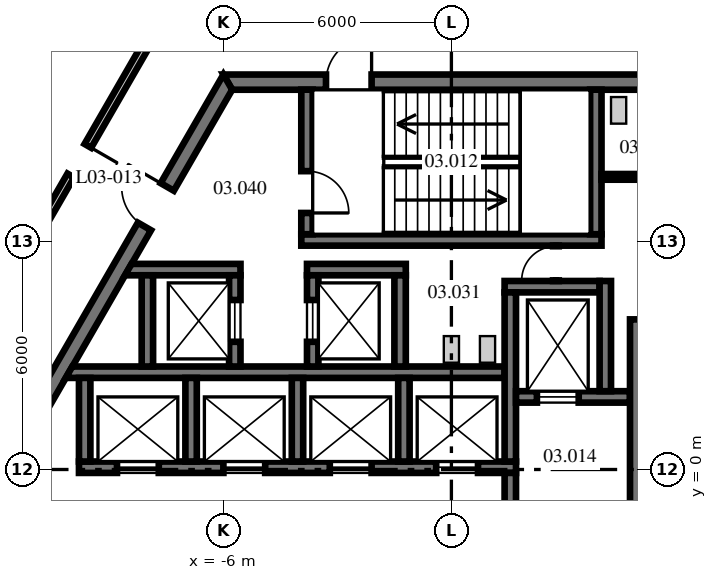
"""IFC4 building model, lengths in metres.
Left out: names, types, materials, properties, quantities, classifications, styles, units other than length and angle.
Written with IfcOpenShell. Run it as: python <this file> out.ifc"""

import sys

from ifc_helpers import new_model, si_unit, direction, frame, frame_2d, origin, place, context, subcontext, project, spatial, polyline, rectangle, outline, extrude, source, transform, mapped, element, fill, save


model = new_model("IFC4")
c1 = context("Model", 3, precision=1e-05, world=origin(), true_north=direction((0.0, 1.0)))
c2 = subcontext(c1, "Body", "Model", "MODEL_VIEW")
j1 = project(units=[si_unit("LENGTHUNIT", "METRE"), si_unit("PLANEANGLEUNIT", "RADIAN")], contexts=[c1])
p1 = place(None, origin())
s1 = spatial("IfcSite", under=j1, at=p1, CompositionType="ELEMENT")
p2 = place(p1, origin())
s2 = spatial("IfcBuilding", under=s1, at=p2, CompositionType="ELEMENT")
p3 = place(p2, frame((0.0, 0.0, 16.0)))
s3 = spatial("IfcBuildingStorey", under=s2, at=p3, CompositionType="ELEMENT", Elevation=16.0)
m1 = source(origin(), c2, "Body", "SweptSolid", [
    extrude(outline(polyline([(-0.115, -0.2), (11.885, -0.2), (11.654, 0.2), (0.115, 0.2), (-0.115, -0.2)])), origin(), (0.0, 0.0, 1.0), 4.1),
])
p4 = place(p3, frame((5.885, 10.192, 0.0), z_axis=(0.0, 0.0, 1.0), x_axis=(-1.0, 0.0, 0.0)))
e1 = element("IfcWall", 1, at=p4, inside=s3, PredefinedType="SHEAR", context=c2, shape_type="MappedRepresentation", body=[
    mapped(m1, transform((0.0, 0.0, 0.0), scale=1.0)),
])
p5 = place(p4, frame((7.985, 0.0, 0.0)))
e2 = element("IfcOpeningElement", 2, at=p5, cuts=e1, PredefinedType="OPENING", context=c2, shape_type="SweptSolid", body=[
    extrude(rectangle(XDim=1.2, YDim=2.1, at=frame_2d((0.6, 1.05))), frame((0.0, 0.21, 0.0), z_axis=(0.0, -1.0, 0.0), x_axis=(1.0, 0.0, 0.0)), (0.0, 0.0, 1.0), 0.42),
])
p6 = place(p3, frame((-5.885, 10.192, 0.0), z_axis=(0.0, 0.0, 1.0), x_axis=(-0.499996592174, -0.866027371285, 0.0)))
e3 = element("IfcWall", 3, at=p6, inside=s3, PredefinedType="SHEAR", context=c2, shape_type="MappedRepresentation", body=[
    mapped(m1, transform((0.0, 0.0, 0.0), scale=1.0)),
])
p7 = place(p6, frame((3.185, 0.0, 0.0)))
e4 = element("IfcOpeningElement", 4, at=p7, cuts=e3, PredefinedType="OPENING", context=c2, shape_type="SweptSolid", body=[
    extrude(rectangle(XDim=1.2, YDim=2.1, at=frame_2d((0.6, 1.05))), frame((0.0, 0.21, 0.0), z_axis=(0.0, -1.0, 0.0), x_axis=(1.0, 0.0, 0.0)), (0.0, 0.0, 1.0), 0.42),
])
p8 = place(p3, frame((-11.769, 0.0, 0.0), z_axis=(0.0, 0.0, 1.0), x_axis=(0.499996592174, -0.866027371285, 0.0)))
e5 = element("IfcWall", 5, at=p8, inside=s3, PredefinedType="SHEAR", context=c2, shape_type="MappedRepresentation", body=[
    mapped(m1, transform((0.0, 0.0, 0.0), scale=1.0)),
])
p9 = place(p8, frame((1.405, 0.0, 0.0)))
e6 = element("IfcOpeningElement", 6, at=p9, cuts=e5, PredefinedType="OPENING", context=c2, shape_type="SweptSolid", body=[
    extrude(rectangle(XDim=1.8, YDim=2.1, at=frame_2d((0.9, 1.05))), frame((0.0, 0.21, 0.0), z_axis=(0.0, -1.0, 0.0), x_axis=(1.0, 0.0, 0.0)), (0.0, 0.0, 1.0), 0.42),
])
p10 = place(p8, frame((7.915, 0.0, 0.0)))
e7 = element("IfcOpeningElement", 7, at=p10, cuts=e5, PredefinedType="OPENING", context=c2, shape_type="SweptSolid", body=[
    extrude(rectangle(XDim=1.2, YDim=2.1, at=frame_2d((0.6, 1.05))), frame((0.0, 0.21, 0.0), z_axis=(0.0, -1.0, 0.0), x_axis=(1.0, 0.0, 0.0)), (0.0, 0.0, 1.0), 0.42),
])
m2 = source(origin(), c2, "Body", "SweptSolid", [
    extrude(rectangle(XDim=11.5, YDim=0.3, at=frame_2d((5.75, 0.0))), origin(), (0.0, 0.0, 1.0), 4.1),
])
p11 = place(p3, frame((-9.8, 0.06, 0.0), z_axis=(0.0, 0.0, 1.0), x_axis=(1.0, 0.0, 0.0)))
e8 = element("IfcWall", 8, at=p11, inside=s3, PredefinedType="SHEAR", context=c2, shape_type="MappedRepresentation", body=[
    mapped(m2, transform((0.0, 0.0, 0.0), scale=1.0)),
])
p12 = place(p11, frame((1.0, 0.0, 0.0)))
e9 = element("IfcOpeningElement", 9, at=p12, cuts=e8, PredefinedType="OPENING", context=c2, shape_type="SweptSolid", body=[
    extrude(rectangle(XDim=1.1, YDim=2.1, at=frame_2d((0.55, 1.05))), frame((0.0, 0.16, 0.0), z_axis=(0.0, -1.0, 0.0), x_axis=(1.0, 0.0, 0.0)), (0.0, 0.0, 1.0), 0.32),
])
p13 = place(p11, frame((3.8, 0.0, 0.0)))
e10 = element("IfcOpeningElement", 10, at=p13, cuts=e8, PredefinedType="OPENING", context=c2, shape_type="SweptSolid", body=[
    extrude(rectangle(XDim=1.1, YDim=2.1, at=frame_2d((0.55, 1.05))), frame((0.0, 0.16, 0.0), z_axis=(0.0, -1.0, 0.0), x_axis=(1.0, 0.0, 0.0)), (0.0, 0.0, 1.0), 0.32),
])
p14 = place(p11, frame((6.6, 0.0, 0.0)))
e11 = element("IfcOpeningElement", 11, at=p14, cuts=e8, PredefinedType="OPENING", context=c2, shape_type="SweptSolid", body=[
    extrude(rectangle(XDim=1.1, YDim=2.1, at=frame_2d((0.55, 1.05))), frame((0.0, 0.16, 0.0), z_axis=(0.0, -1.0, 0.0), x_axis=(1.0, 0.0, 0.0)), (0.0, 0.0, 1.0), 0.32),
])
p15 = place(p11, frame((9.4, 0.0, 0.0)))
e12 = element("IfcOpeningElement", 12, at=p15, cuts=e8, PredefinedType="OPENING", context=c2, shape_type="SweptSolid", body=[
    extrude(rectangle(XDim=1.1, YDim=2.1, at=frame_2d((0.55, 1.05))), frame((0.0, 0.16, 0.0), z_axis=(0.0, -1.0, 0.0), x_axis=(1.0, 0.0, 0.0)), (0.0, 0.0, 1.0), 0.32),
])
m3 = source(origin(), c2, "Body", "SweptSolid", [
    extrude(outline(polyline([(11.2, -0.15), (-0.349, -0.15), (-0.176, 0.15), (11.2, 0.15), (11.2, -0.15)])), origin(), (0.0, 0.0, 1.0), 4.1),
])
p16 = place(p3, frame((-9.8, 2.56, 0.0), z_axis=(0.0, 0.0, 1.0), x_axis=(1.0, 0.0, 0.0)))
e13 = element("IfcWall", 13, at=p16, inside=s3, PredefinedType="SHEAR", context=c2, shape_type="MappedRepresentation", body=[
    mapped(m3, transform((0.0, 0.0, 0.0), scale=1.0)),
])
m4 = source(origin(), c2, "Body", "SweptSolid", [
    extrude(rectangle(XDim=2.5, YDim=0.3, at=frame_2d((1.25, 0.0))), origin(), (0.0, 0.0, 1.0), 4.1),
])
p17 = place(p3, frame((1.4, 4.81, 0.0), z_axis=(0.0, 0.0, 1.0), x_axis=(1.0, 0.0, 0.0)))
e14 = element("IfcWall", 14, at=p17, inside=s3, PredefinedType="SHEAR", context=c2, shape_type="MappedRepresentation", body=[
    mapped(m4, transform((0.0, 0.0, 0.0), scale=1.0)),
])
m5 = source(origin(), c2, "Body", "SweptSolid", [
    extrude(rectangle(XDim=4.45, YDim=0.3, at=frame_2d((2.225, 0.0))), origin(), (0.0, 0.0, 1.0), 4.1),
])
p18 = place(p3, frame((1.55, 0.21, 0.0), z_axis=(0.0, 0.0, 1.0), x_axis=(0.0, 1.0, 0.0)))
e15 = element("IfcWall", 15, at=p18, inside=s3, PredefinedType="SHEAR", context=c2, shape_type="MappedRepresentation", body=[
    mapped(m5, transform((0.0, 0.0, 0.0), scale=1.0)),
])
m6 = source(origin(), c2, "Body", "SweptSolid", [
    extrude(rectangle(XDim=3.0, YDim=0.3, at=frame_2d((1.5, 0.0))), origin(), (0.0, 0.0, 1.0), 4.1),
])
p19 = place(p3, frame((1.7, 1.91, 0.0), z_axis=(0.0, 0.0, 1.0), x_axis=(1.0, 0.0, 0.0)))
e16 = element("IfcWall", 16, at=p19, inside=s3, PredefinedType="SHEAR", context=c2, shape_type="MappedRepresentation", body=[
    mapped(m6, transform((0.0, 0.0, 0.0), scale=1.0)),
])
p20 = place(p19, frame((0.55, 0.0, 0.0)))
e17 = element("IfcOpeningElement", 17, at=p20, cuts=e16, PredefinedType="OPENING", context=c2, shape_type="SweptSolid", body=[
    extrude(rectangle(XDim=1.1, YDim=2.1, at=frame_2d((0.55, 1.05))), frame((0.0, 0.16, 0.0), z_axis=(0.0, -1.0, 0.0), x_axis=(1.0, 0.0, 0.0)), (0.0, 0.0, 1.0), 0.32),
])
m7 = source(origin(), c2, "Body", "SweptSolid", [
    extrude(rectangle(XDim=2.9, YDim=0.3, at=frame_2d((1.45, 0.0))), origin(), (0.0, 0.0, 1.0), 4.1),
])
p21 = place(p3, frame((4.05, 2.06, 0.0), z_axis=(0.0, 0.0, 1.0), x_axis=(0.0, 1.0, 0.0)))
e18 = element("IfcWall", 18, at=p21, inside=s3, PredefinedType="SHEAR", context=c2, shape_type="MappedRepresentation", body=[
    mapped(m7, transform((0.0, 0.0, 0.0), scale=1.0)),
])
m8 = source(origin(), c2, "Body", "SweptSolid", [
    extrude(rectangle(XDim=2.2, YDim=0.3, at=frame_2d((1.1, 0.0))), origin(), (0.0, 0.0, 1.0), 4.1),
])
p22 = place(p3, frame((-9.65, 0.21, 0.0), z_axis=(0.0, 0.0, 1.0), x_axis=(0.0, 1.0, 0.0)))
e19 = element("IfcWall", 19, at=p22, inside=s3, PredefinedType="SHEAR", context=c2, shape_type="MappedRepresentation", body=[
    mapped(m8, transform((0.0, 0.0, 0.0), scale=1.0)),
])
p23 = place(p3, frame((1.55, -3.09, 0.0), z_axis=(0.0, 0.0, 1.0), x_axis=(0.0, 1.0, 0.0)))
e20 = element("IfcWall", 20, at=p23, inside=s3, PredefinedType="SHEAR", context=c2, shape_type="MappedRepresentation", body=[
    mapped(m6, transform((0.0, 0.0, 0.0), scale=1.0)),
])
p24 = place(p23, frame((0.9, 0.0, 0.0)))
e21 = element("IfcOpeningElement", 21, at=p24, cuts=e20, PredefinedType="OPENING", context=c2, shape_type="SweptSolid", body=[
    extrude(rectangle(XDim=1.2, YDim=2.1, at=frame_2d((0.6, 1.05))), frame((0.0, 0.16, 0.0), z_axis=(0.0, -1.0, 0.0), x_axis=(1.0, 0.0, 0.0)), (0.0, 0.0, 1.0), 0.32),
])
m9 = source(origin(), c2, "Body", "SweptSolid", [
    extrude(outline(polyline([(-0.15, -0.15), (9.99, -0.15), (9.99, 0.15), (0.15, 0.15), (-0.15, -0.15)])), origin(), (0.0, 0.0, 1.0), 4.1),
])
p25 = place(p3, frame((4.85, -6.04, 0.0), z_axis=(0.0, 0.0, 1.0), x_axis=(0.0, 1.0, 0.0)))
e22 = element("IfcWall", 22, at=p25, inside=s3, PredefinedType="SHEAR", context=c2, shape_type="MappedRepresentation", body=[
    mapped(m9, transform((0.0, 0.0, 0.0), scale=1.0)),
])
p26 = place(p25, frame((3.19, 0.0, 0.0)))
e23 = element("IfcOpeningElement", 23, at=p26, cuts=e22, PredefinedType="OPENING", context=c2, shape_type="SweptSolid", body=[
    extrude(rectangle(XDim=1.1, YDim=2.1, at=frame_2d((0.55, 1.05))), frame((0.0, 0.16, 0.0), z_axis=(0.0, -1.0, 0.0), x_axis=(1.0, 0.0, 0.0)), (0.0, 0.0, 1.0), 0.32),
])
m10 = source(origin(), c2, "Body", "SweptSolid", [
    extrude(rectangle(XDim=7.9, YDim=0.3, at=frame_2d((3.95, 0.0))), origin(), (0.0, 0.0, 1.0), 4.1),
])
p27 = place(p3, frame((-3.95, 6.04, 0.0), z_axis=(0.0, 0.0, 1.0), x_axis=(1.0, 0.0, 0.0)))
e24 = element("IfcWall", 24, at=p27, inside=s3, PredefinedType="SHEAR", context=c2, shape_type="MappedRepresentation", body=[
    mapped(m10, transform((0.0, 0.0, 0.0), scale=1.0)),
])
m11 = source(origin(), c2, "Body", "SweptSolid", [
    extrude(outline(polyline([(0.0, -0.15), (0.0, 0.15), (3.804, 0.15), (3.804, -0.15), (0.0, -0.15)])), origin(), (0.0, 0.0, 1.0), 4.1),
])
p28 = place(p3, frame((-3.8, 6.19, 0.0), z_axis=(0.0, 0.0, 1.0), x_axis=(0.0, 1.0, 0.0)))
e25 = element("IfcWall", 25, at=p28, inside=s3, PredefinedType="SHEAR", context=c2, shape_type="MappedRepresentation", body=[
    mapped(m11, transform((0.0, 0.0, 0.0), scale=1.0)),
])
p29 = place(p28, frame((0.56, 0.0, 0.0)))
e26 = element("IfcOpeningElement", 26, at=p29, cuts=e25, PredefinedType="OPENING", context=c2, shape_type="SweptSolid", body=[
    extrude(rectangle(XDim=1.1, YDim=2.1, at=frame_2d((0.55, 1.05))), frame((0.0, 0.16, 0.0), z_axis=(0.0, -1.0, 0.0), x_axis=(1.0, 0.0, 0.0)), (0.0, 0.0, 1.0), 0.32),
])
p30 = place(p3, frame((3.8, 6.19, 0.0), z_axis=(0.0, 0.0, 1.0), x_axis=(0.0, 1.0, 0.0)))
e27 = element("IfcWall", 27, at=p30, inside=s3, PredefinedType="SHEAR", context=c2, shape_type="MappedRepresentation", body=[
    mapped(m11, transform((0.0, 0.0, 0.0), scale=1.0)),
])
m12 = source(origin(), c2, "Body", "SweptSolid", [
    extrude(outline(polyline([(2.6, -0.15), (-0.44, -0.15), (-0.267, 0.15), (2.6, 0.15), (2.6, -0.15)])), origin(), (0.0, 0.0, 1.0), 4.1),
])
p31 = place(p3, frame((-8.15, 5.26, 0.0), z_axis=(0.0, 0.0, 1.0), x_axis=(1.0, 0.0, 0.0)))
e28 = element("IfcWall", 28, at=p31, inside=s3, PredefinedType="SHEAR", context=c2, shape_type="MappedRepresentation", body=[
    mapped(m12, transform((0.0, 0.0, 0.0), scale=1.0)),
])
m13 = source(origin(), c2, "Body", "SweptSolid", [
    extrude(rectangle(XDim=2.4, YDim=0.3, at=frame_2d((1.2, 0.0))), origin(), (0.0, 0.0, 1.0), 4.1),
])
p32 = place(p3, frame((-8.0, 2.71, 0.0), z_axis=(0.0, 0.0, 1.0), x_axis=(0.0, 1.0, 0.0)))
e29 = element("IfcWall", 29, at=p32, inside=s3, PredefinedType="SHEAR", context=c2, shape_type="MappedRepresentation", body=[
    mapped(m13, transform((0.0, 0.0, 0.0), scale=1.0)),
])
p33 = place(p3, frame((-5.7, 2.71, 0.0), z_axis=(0.0, 0.0, 1.0), x_axis=(0.0, 1.0, 0.0)))
e30 = element("IfcWall", 30, at=p33, inside=s3, PredefinedType="SHEAR", context=c2, shape_type="MappedRepresentation", body=[
    mapped(m13, transform((0.0, 0.0, 0.0), scale=1.0)),
])
p34 = place(p33, frame((0.65, 0.0, 0.0)))
e31 = element("IfcOpeningElement", 31, at=p34, cuts=e30, PredefinedType="OPENING", context=c2, shape_type="SweptSolid", body=[
    extrude(rectangle(XDim=1.1, YDim=2.1, at=frame_2d((0.55, 1.05))), frame((0.0, 0.16, 0.0), z_axis=(0.0, -1.0, 0.0), x_axis=(1.0, 0.0, 0.0)), (0.0, 0.0, 1.0), 0.32),
])
m14 = source(origin(), c2, "Body", "SweptSolid", [
    extrude(rectangle(XDim=2.6, YDim=0.3, at=frame_2d((1.3, 0.0))), origin(), (0.0, 0.0, 1.0), 4.1),
])
p35 = place(p3, frame((-3.8, 5.26, 0.0), z_axis=(0.0, 0.0, 1.0), x_axis=(1.0, 0.0, 0.0)))
e32 = element("IfcWall", 32, at=p35, inside=s3, PredefinedType="SHEAR", context=c2, shape_type="MappedRepresentation", body=[
    mapped(m14, transform((0.0, 0.0, 0.0), scale=1.0)),
])
p36 = place(p3, frame((-3.65, 2.71, 0.0), z_axis=(0.0, 0.0, 1.0), x_axis=(0.0, 1.0, 0.0)))
e33 = element("IfcWall", 33, at=p36, inside=s3, PredefinedType="SHEAR", context=c2, shape_type="MappedRepresentation", body=[
    mapped(m13, transform((0.0, 0.0, 0.0), scale=1.0)),
])
p37 = place(p36, frame((0.65, 0.0, 0.0)))
e34 = element("IfcOpeningElement", 34, at=p37, cuts=e33, PredefinedType="OPENING", context=c2, shape_type="SweptSolid", body=[
    extrude(rectangle(XDim=1.1, YDim=2.1, at=frame_2d((0.55, 1.05))), frame((0.0, 0.16, 0.0), z_axis=(0.0, -1.0, 0.0), x_axis=(1.0, 0.0, 0.0)), (0.0, 0.0, 1.0), 0.32),
])
p38 = place(p3, frame((-1.35, 2.71, 0.0), z_axis=(0.0, 0.0, 1.0), x_axis=(0.0, 1.0, 0.0)))
e35 = element("IfcWall", 35, at=p38, inside=s3, PredefinedType="SHEAR", context=c2, shape_type="MappedRepresentation", body=[
    mapped(m13, transform((0.0, 0.0, 0.0), scale=1.0)),
])
for number, where, z_axis, x_axis in (
    (36, (-6.85, 0.21, 0.0), (0.0, 0.0, 1.0), (0.0, 1.0, 0.0)),
    (37, (-4.05, 0.21, 0.0), (0.0, 0.0, 1.0), (0.0, 1.0, 0.0)),
    (38, (-1.25, 0.21, 0.0), (0.0, 0.0, 1.0), (0.0, 1.0, 0.0)),
):
    element("IfcWall", number, at=place(p3, frame(where, z_axis=z_axis, x_axis=x_axis)), inside=s3, PredefinedType="SHEAR", context=c2, shape_type="MappedRepresentation", body=[
        mapped(m8, transform((0.0, 0.0, 0.0), scale=1.0)),
    ])
p39 = place(p3, frame((3.95, 7.7, 0.0), z_axis=(0.0, 0.0, 1.0), x_axis=(1.0, 0.0, 0.0)))
e39 = element("IfcWall", 39, at=p39, inside=s3, PredefinedType="PARTITIONING", context=c2, shape_type="SweptSolid", body=[
    extrude(outline(polyline([(0.0, -0.075), (0.0, 0.075), (3.102, 0.075), (3.188, -0.075), (0.0, -0.075)])), origin(), (0.0, 0.0, 1.0), 4.1),
])
p40 = place(p39, frame((1.6, 0.0, 0.0)))
e40 = element("IfcOpeningElement", 40, at=p40, cuts=e39, PredefinedType="OPENING", context=c2, shape_type="SweptSolid", body=[
    extrude(rectangle(XDim=0.9, YDim=2.1, at=frame_2d((0.45, 1.05))), frame((0.0, 0.085, 0.0), z_axis=(0.0, -1.0, 0.0), x_axis=(1.0, 0.0, 0.0)), (0.0, 0.0, 1.0), 0.17),
])
p41 = place(p3, frame((2.75, 4.96, 0.0), z_axis=(0.0, 0.0, 1.0), x_axis=(0.0, 1.0, 0.0)))
e41 = element("IfcWall", 41, at=p41, inside=s3, PredefinedType="PARTITIONING", context=c2, shape_type="SweptSolid", body=[
    extrude(rectangle(XDim=0.93, YDim=0.15, at=frame_2d((0.465, 0.0))), origin(), (0.0, 0.0, 1.0), 4.1),
])
p42 = place(p41, frame((0.015, 0.0, 0.0)))
e42 = element("IfcOpeningElement", 42, at=p42, cuts=e41, PredefinedType="OPENING", context=c2, shape_type="SweptSolid", body=[
    extrude(rectangle(XDim=0.9, YDim=2.1, at=frame_2d((0.45, 1.05))), frame((0.0, 0.085, 0.0), z_axis=(0.0, -1.0, 0.0), x_axis=(1.0, 0.0, 0.0)), (0.0, 0.0, 1.0), 0.17),
])
p43 = place(p3, frame((-12.307, 3.768, 0.0), z_axis=(0.0, 0.0, 1.0), x_axis=(0.500011000363, 0.866019052629, 0.0)))
e43 = element("IfcWall", 43, at=p43, inside=s3, PredefinedType="PARTITIONING", context=c2, shape_type="SweptSolid", body=[
    extrude(rectangle(XDim=10.132, YDim=0.2, at=frame_2d((5.066, 0.0))), origin(), (0.0, 0.0, 1.0), 4.1),
])
p44 = place(p43, frame((4.582, 0.0, 0.0)))
e44 = element("IfcOpeningElement", 44, at=p44, cuts=e43, PredefinedType="OPENING", context=c2, shape_type="SweptSolid", body=[
    extrude(rectangle(XDim=0.9, YDim=2.1, at=frame_2d((0.45, 1.05))), frame((0.0, 0.11, 0.0), z_axis=(0.0, -1.0, 0.0), x_axis=(1.0, 0.0, 0.0)), (0.0, 0.0, 1.0), 0.22),
])
p45 = place(p5, frame((1.2, 0.0, 0.0), z_axis=(0.0, 0.0, 1.0), x_axis=(-1.0, 0.0, 0.0)))
e45 = element("IfcDoor", 45, at=p45, inside=s3, OperationType="SINGLE_SWING_RIGHT", PredefinedType="DOOR", context=c2, shape_type="SweptSolid", body=[
    extrude(rectangle(XDim=1.2, YDim=2.1, at=frame_2d((0.6, 1.05))), frame((0.0, 0.025, 0.0), z_axis=(0.0, -1.0, 0.0), x_axis=(1.0, 0.0, 0.0)), (0.0, 0.0, 1.0), 0.05),
])
fill(e2, e45)
p46 = place(p7, frame((1.2, 0.0, 0.0), z_axis=(0.0, 0.0, 1.0), x_axis=(-1.0, 0.0, 0.0)))
e46 = element("IfcDoor", 46, at=p46, inside=s3, OperationType="SINGLE_SWING_RIGHT", PredefinedType="DOOR", context=c2, shape_type="SweptSolid", body=[
    extrude(rectangle(XDim=1.2, YDim=2.1, at=frame_2d((0.6, 1.05))), frame((0.0, 0.025, 0.0), z_axis=(0.0, -1.0, 0.0), x_axis=(1.0, 0.0, 0.0)), (0.0, 0.0, 1.0), 0.05),
])
fill(e4, e46)
p47 = place(p29, frame((1.1, 0.0, 0.0), z_axis=(0.0, 0.0, 1.0), x_axis=(-1.0, 0.0, 0.0)))
e47 = element("IfcDoor", 47, at=p47, inside=s3, OperationType="SINGLE_SWING_RIGHT", PredefinedType="DOOR", context=c2, shape_type="SweptSolid", body=[
    extrude(rectangle(XDim=1.1, YDim=2.1, at=frame_2d((0.55, 1.05))), frame((0.0, 0.025, 0.0), z_axis=(0.0, -1.0, 0.0), x_axis=(1.0, 0.0, 0.0)), (0.0, 0.0, 1.0), 0.05),
])
fill(e26, e47)
p48 = place(p42, origin())
e48 = element("IfcDoor", 48, at=p48, inside=s3, OperationType="SINGLE_SWING_LEFT", PredefinedType="DOOR", context=c2, shape_type="SweptSolid", body=[
    extrude(rectangle(XDim=0.9, YDim=2.1, at=frame_2d((0.45, 1.05))), frame((0.0, 0.025, 0.0), z_axis=(0.0, -1.0, 0.0), x_axis=(1.0, 0.0, 0.0)), (0.0, 0.0, 1.0), 0.05),
])
fill(e42, e48)
p49 = place(p12, origin())
e49 = element("IfcDoor", 49, at=p49, inside=s3, OperationType="DOUBLE_DOOR_SLIDING", PredefinedType="DOOR", context=c2, shape_type="SweptSolid", body=[
    extrude(rectangle(XDim=1.1, YDim=2.1, at=frame_2d((0.55, 1.05))), frame((0.0, 0.025, 0.0), z_axis=(0.0, -1.0, 0.0), x_axis=(1.0, 0.0, 0.0)), (0.0, 0.0, 1.0), 0.05),
])
fill(e9, e49)
p50 = place(p13, origin())
e50 = element("IfcDoor", 50, at=p50, inside=s3, OperationType="DOUBLE_DOOR_SLIDING", PredefinedType="DOOR", context=c2, shape_type="SweptSolid", body=[
    extrude(rectangle(XDim=1.1, YDim=2.1, at=frame_2d((0.55, 1.05))), frame((0.0, 0.025, 0.0), z_axis=(0.0, -1.0, 0.0), x_axis=(1.0, 0.0, 0.0)), (0.0, 0.0, 1.0), 0.05),
])
fill(e10, e50)
p51 = place(p14, origin())
e51 = element("IfcDoor", 51, at=p51, inside=s3, OperationType="DOUBLE_DOOR_SLIDING", PredefinedType="DOOR", context=c2, shape_type="SweptSolid", body=[
    extrude(rectangle(XDim=1.1, YDim=2.1, at=frame_2d((0.55, 1.05))), frame((0.0, 0.025, 0.0), z_axis=(0.0, -1.0, 0.0), x_axis=(1.0, 0.0, 0.0)), (0.0, 0.0, 1.0), 0.05),
])
fill(e11, e51)
p52 = place(p15, origin())
e52 = element("IfcDoor", 52, at=p52, inside=s3, OperationType="DOUBLE_DOOR_SLIDING", PredefinedType="DOOR", context=c2, shape_type="SweptSolid", body=[
    extrude(rectangle(XDim=1.1, YDim=2.1, at=frame_2d((0.55, 1.05))), frame((0.0, 0.025, 0.0), z_axis=(0.0, -1.0, 0.0), x_axis=(1.0, 0.0, 0.0)), (0.0, 0.0, 1.0), 0.05),
])
fill(e12, e52)
p53 = place(p20, origin())
e53 = element("IfcDoor", 53, at=p53, inside=s3, OperationType="DOUBLE_DOOR_SLIDING", PredefinedType="DOOR", context=c2, shape_type="SweptSolid", body=[
    extrude(rectangle(XDim=1.1, YDim=2.1, at=frame_2d((0.55, 1.05))), frame((0.0, 0.025, 0.0), z_axis=(0.0, -1.0, 0.0), x_axis=(1.0, 0.0, 0.0)), (0.0, 0.0, 1.0), 0.05),
])
fill(e17, e53)
p54 = place(p34, origin())
e54 = element("IfcDoor", 54, at=p54, inside=s3, OperationType="DOUBLE_DOOR_SLIDING", PredefinedType="DOOR", context=c2, shape_type="SweptSolid", body=[
    extrude(rectangle(XDim=1.1, YDim=2.1, at=frame_2d((0.55, 1.05))), frame((0.0, 0.025, 0.0), z_axis=(0.0, -1.0, 0.0), x_axis=(1.0, 0.0, 0.0)), (0.0, 0.0, 1.0), 0.05),
])
fill(e31, e54)
p55 = place(p37, origin())
e55 = element("IfcDoor", 55, at=p55, inside=s3, OperationType="DOUBLE_DOOR_SLIDING", PredefinedType="DOOR", context=c2, shape_type="SweptSolid", body=[
    extrude(rectangle(XDim=1.1, YDim=2.1, at=frame_2d((0.55, 1.05))), frame((0.0, 0.025, 0.0), z_axis=(0.0, -1.0, 0.0), x_axis=(1.0, 0.0, 0.0)), (0.0, 0.0, 1.0), 0.05),
])
fill(e34, e55)
p56 = place(p44, origin())
e56 = element("IfcDoor", 56, at=p56, inside=s3, OperationType="SINGLE_SWING_RIGHT", PredefinedType="DOOR", context=c2, shape_type="SweptSolid", body=[
    extrude(rectangle(XDim=0.9, YDim=2.1, at=frame_2d((0.45, 1.05))), frame((0.0, 0.025, 0.0), z_axis=(0.0, -1.0, 0.0), x_axis=(1.0, 0.0, 0.0)), (0.0, 0.0, 1.0), 0.05),
])
fill(e44, e56)
save(model, sys.argv[1])
